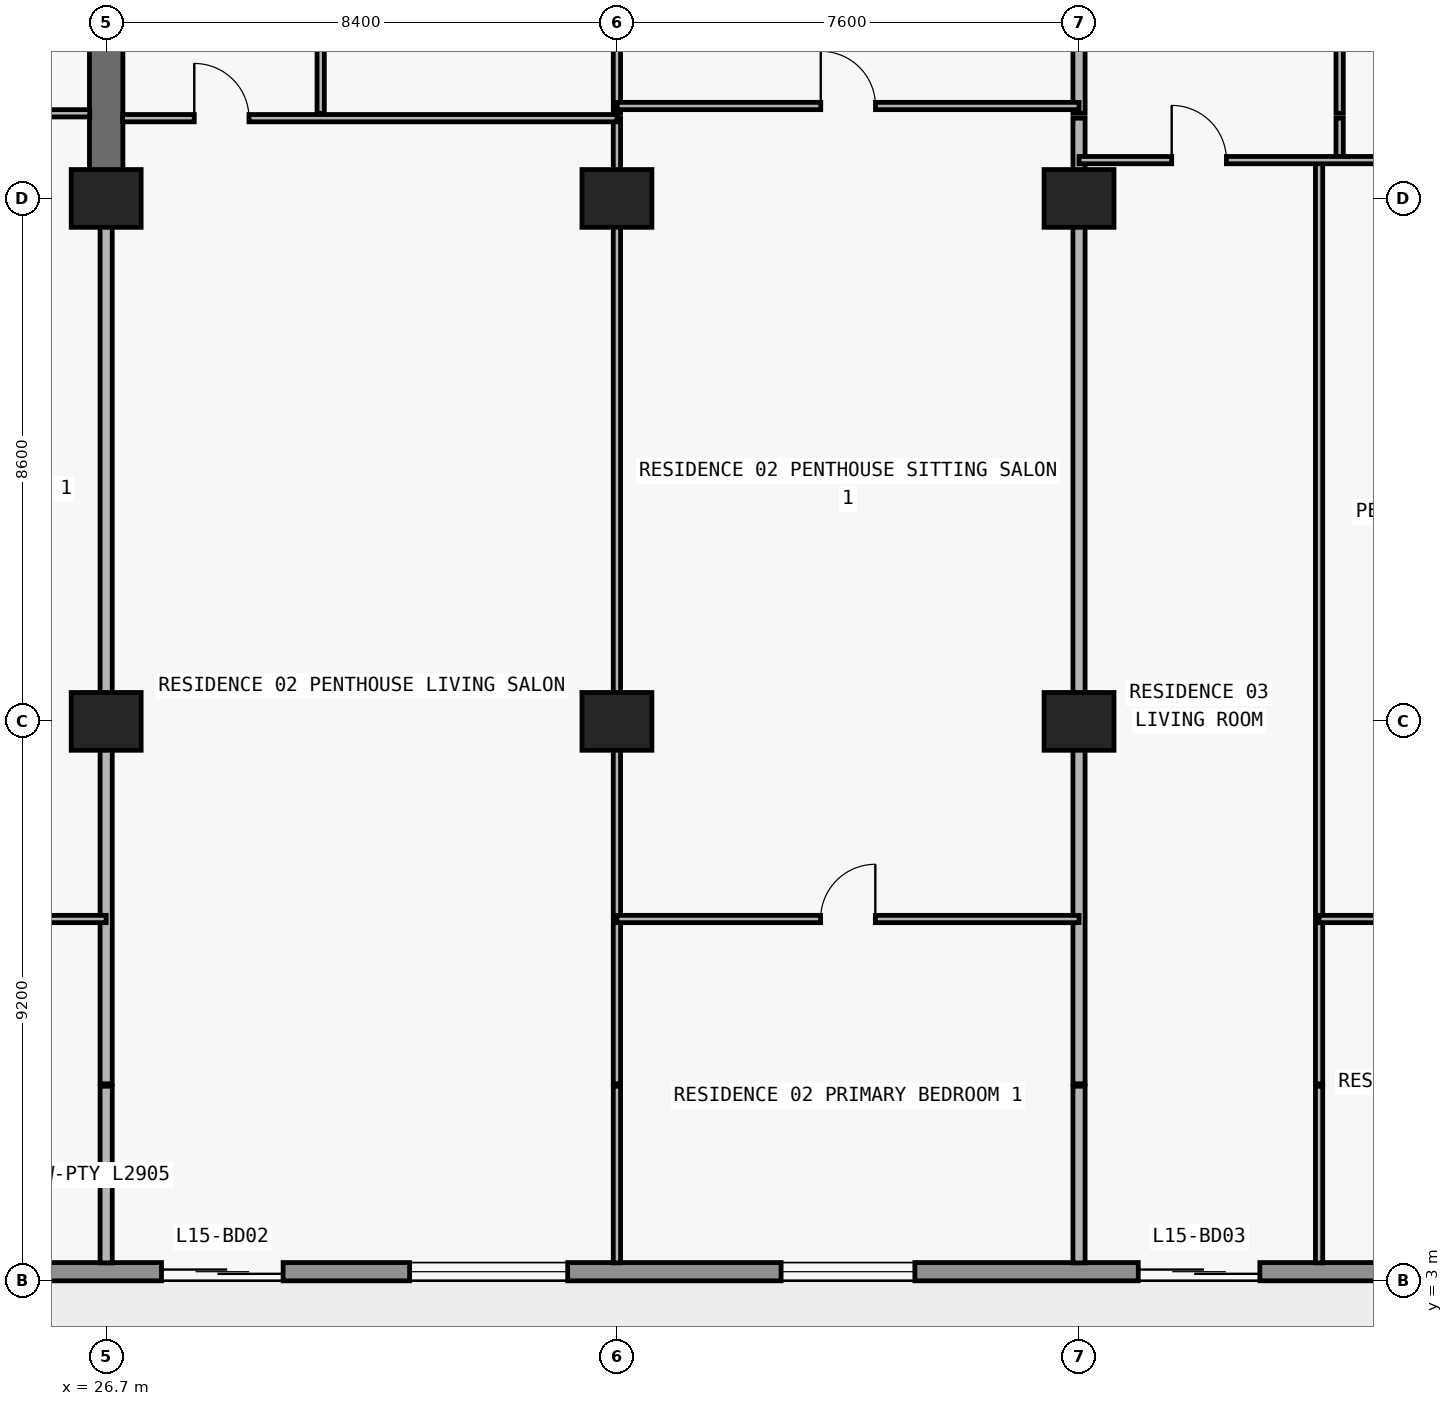
"""IFC4 building model, lengths in metres.
Left out: names, types, materials, properties, quantities, classifications, styles, units other than length and angle.
Written with IfcOpenShell. Run it as: python <this file> out.ifc"""

import sys

from ifc_helpers import new_model, si_unit, direction, frame, frame_2d, origin, origin_2d, place, context, subcontext, project, spatial, rectangle, extrude, element, fill, save


model = new_model("IFC4")
c1 = context("Model", 3, precision=1e-05, world=origin(), true_north=direction((0.0, 1.0)))
c2 = subcontext(c1, "Body", "Model", "MODEL_VIEW")
j1 = project(units=[si_unit("LENGTHUNIT", "METRE"), si_unit("PLANEANGLEUNIT", "RADIAN")], contexts=[c1])
p1 = place(None, origin())
s1 = spatial("IfcSite", under=j1, at=p1, CompositionType="ELEMENT")
p2 = place(p1, origin())
s2 = spatial("IfcBuilding", under=s1, at=p2, CompositionType="ELEMENT")
p3 = place(p2, frame((0.0, 0.0, 59.7)))
s3 = spatial("IfcBuildingStorey", under=s2, at=p3, CompositionType="ELEMENT", Elevation=59.7)
for number, where, z_axis, x_axis in (
    (1, (26.7, 12.2, 0.0), (0.0, 0.0, 1.0), (1.0, 0.0, 0.0)),
    (2, (35.1, 12.2, 0.0), (0.0, 0.0, 1.0), (1.0, 0.0, 0.0)),
    (3, (42.7, 12.2, 0.0), (0.0, 0.0, 1.0), (1.0, 0.0, 0.0)),
    (4, (26.7, 20.8, 0.0), (0.0, 0.0, 1.0), (1.0, 0.0, 0.0)),
    (5, (35.1, 20.8, 0.0), (0.0, 0.0, 1.0), (1.0, 0.0, 0.0)),
    (6, (42.7, 20.8, 0.0), (0.0, 0.0, 1.0), (1.0, 0.0, 0.0)),
):
    element("IfcColumn", number, at=place(p3, frame(where, z_axis=z_axis, x_axis=x_axis)), inside=s3, PredefinedType="COLUMN", context=c2, shape_type="SweptSolid", body=[
        extrude(rectangle(XDim=1.15, YDim=0.95, at=origin_2d()), origin(), (0.0, 0.0, 1.0), 3.05),
    ])
p4 = place(p3, frame((26.7, 20.8, 0.0), z_axis=(0.0, 0.0, 1.0), x_axis=(0.0, 1.0, 0.0)))
e7 = element("IfcWall", 7, at=p4, inside=s3, PredefinedType="SHEAR", context=c2, shape_type="SweptSolid", body=[
    extrude(rectangle(XDim=8.6, YDim=0.55, at=frame_2d((4.3, 0.0))), origin(), (0.0, 0.0, 1.0), 3.05),
])
p5 = place(p3, frame((72.7, 3.15, 0.0), z_axis=(0.0, 0.0, 1.0), x_axis=(-1.0, 0.0, 0.0)))
e8 = element("IfcWall", 8, at=p5, inside=s3, PredefinedType="STANDARD", context=c2, shape_type="SweptSolid", body=[
    extrude(rectangle(XDim=67.6, YDim=0.3, at=frame_2d((33.8, 0.0))), origin(), (0.0, 0.0, 1.0), 3.05),
])
p6 = place(p5, frame((59.89, 0.0, 0.0)))
e9 = element("IfcOpeningElement", 9, at=p6, cuts=e8, PredefinedType="OPENING", context=c2, shape_type="SweptSolid", body=[
    extrude(rectangle(XDim=2.0, YDim=2.3, at=frame_2d((1.0, 1.15))), frame((0.0, 0.16, 0.0), z_axis=(0.0, -1.0, 0.0), x_axis=(1.0, 0.0, 0.0)), (0.0, 0.0, 1.0), 0.32),
])
p7 = place(p5, frame((55.21, 0.0, 0.65)))
e10 = element("IfcOpeningElement", 10, at=p7, cuts=e8, PredefinedType="OPENING", context=c2, shape_type="SweptSolid", body=[
    extrude(rectangle(XDim=2.6, YDim=1.85, at=frame_2d((1.3, 0.925))), frame((0.0, 0.16, 0.0), z_axis=(0.0, -1.0, 0.0), x_axis=(1.0, 0.0, 0.0)), (0.0, 0.0, 1.0), 0.32),
])
p8 = place(p5, frame((49.1, 0.0, 0.85)))
e11 = element("IfcOpeningElement", 11, at=p8, cuts=e8, PredefinedType="OPENING", context=c2, shape_type="SweptSolid", body=[
    extrude(rectangle(XDim=2.2, YDim=1.55, at=frame_2d((1.1, 0.775))), frame((0.0, 0.16, 0.0), z_axis=(0.0, -1.0, 0.0), x_axis=(1.0, 0.0, 0.0)), (0.0, 0.0, 1.0), 0.32),
])
p9 = place(p5, frame((43.09, 0.0, 0.0)))
e12 = element("IfcOpeningElement", 12, at=p9, cuts=e8, PredefinedType="OPENING", context=c2, shape_type="SweptSolid", body=[
    extrude(rectangle(XDim=2.0, YDim=2.3, at=frame_2d((1.0, 1.15))), frame((0.0, 0.16, 0.0), z_axis=(0.0, -1.0, 0.0), x_axis=(1.0, 0.0, 0.0)), (0.0, 0.0, 1.0), 0.32),
])
p10 = place(p5, frame((38.41, 0.0, 0.65)))
e13 = element("IfcOpeningElement", 13, at=p10, cuts=e8, PredefinedType="OPENING", context=c2, shape_type="SweptSolid", body=[
    extrude(rectangle(XDim=2.6, YDim=1.85, at=frame_2d((1.3, 0.925))), frame((0.0, 0.16, 0.0), z_axis=(0.0, -1.0, 0.0), x_axis=(1.0, 0.0, 0.0)), (0.0, 0.0, 1.0), 0.32),
])
p11 = place(p5, frame((32.7, 0.0, 0.85)))
e14 = element("IfcOpeningElement", 14, at=p11, cuts=e8, PredefinedType="OPENING", context=c2, shape_type="SweptSolid", body=[
    extrude(rectangle(XDim=2.2, YDim=1.55, at=frame_2d((1.1, 0.775))), frame((0.0, 0.16, 0.0), z_axis=(0.0, -1.0, 0.0), x_axis=(1.0, 0.0, 0.0)), (0.0, 0.0, 1.0), 0.32),
])
p12 = place(p5, frame((27.026, 0.0, 0.0)))
e15 = element("IfcOpeningElement", 15, at=p12, cuts=e8, PredefinedType="OPENING", context=c2, shape_type="SweptSolid", body=[
    extrude(rectangle(XDim=2.0, YDim=2.3, at=frame_2d((1.0, 1.15))), frame((0.0, 0.16, 0.0), z_axis=(0.0, -1.0, 0.0), x_axis=(1.0, 0.0, 0.0)), (0.0, 0.0, 1.0), 0.32),
])
p13 = place(p5, frame((22.726, 0.0, 0.85)))
e16 = element("IfcOpeningElement", 16, at=p13, cuts=e8, PredefinedType="OPENING", context=c2, shape_type="SweptSolid", body=[
    extrude(rectangle(XDim=2.2, YDim=1.55, at=frame_2d((1.1, 0.775))), frame((0.0, 0.16, 0.0), z_axis=(0.0, -1.0, 0.0), x_axis=(1.0, 0.0, 0.0)), (0.0, 0.0, 1.0), 0.32),
])
p14 = place(p5, frame((18.29, 0.0, 0.0)))
e17 = element("IfcOpeningElement", 17, at=p14, cuts=e8, PredefinedType="OPENING", context=c2, shape_type="SweptSolid", body=[
    extrude(rectangle(XDim=2.0, YDim=2.3, at=frame_2d((1.0, 1.15))), frame((0.0, 0.16, 0.0), z_axis=(0.0, -1.0, 0.0), x_axis=(1.0, 0.0, 0.0)), (0.0, 0.0, 1.0), 0.32),
])
p15 = place(p5, frame((14.19, 0.0, 0.85)))
e18 = element("IfcOpeningElement", 18, at=p15, cuts=e8, PredefinedType="OPENING", context=c2, shape_type="SweptSolid", body=[
    extrude(rectangle(XDim=1.8, YDim=1.55, at=frame_2d((0.9, 0.775))), frame((0.0, 0.16, 0.0), z_axis=(0.0, -1.0, 0.0), x_axis=(1.0, 0.0, 0.0)), (0.0, 0.0, 1.0), 0.32),
])
p16 = place(p5, frame((10.226, 0.0, 0.0)))
e19 = element("IfcOpeningElement", 19, at=p16, cuts=e8, PredefinedType="OPENING", context=c2, shape_type="SweptSolid", body=[
    extrude(rectangle(XDim=2.0, YDim=2.3, at=frame_2d((1.0, 1.15))), frame((0.0, 0.16, 0.0), z_axis=(0.0, -1.0, 0.0), x_axis=(1.0, 0.0, 0.0)), (0.0, 0.0, 1.0), 0.32),
])
p17 = place(p5, frame((5.926, 0.0, 0.85)))
e20 = element("IfcOpeningElement", 20, at=p17, cuts=e8, PredefinedType="OPENING", context=c2, shape_type="SweptSolid", body=[
    extrude(rectangle(XDim=2.2, YDim=1.55, at=frame_2d((1.1, 0.775))), frame((0.0, 0.16, 0.0), z_axis=(0.0, -1.0, 0.0), x_axis=(1.0, 0.0, 0.0)), (0.0, 0.0, 1.0), 0.32),
])
p18 = place(p3, frame((26.7, 3.295, 0.0), z_axis=(0.0, 0.0, 1.0), x_axis=(0.0, 1.0, 0.0)))
e21 = element("IfcWall", 21, at=p18, inside=s3, PredefinedType="PARTITIONING", context=c2, shape_type="SweptSolid", body=[
    extrude(rectangle(XDim=2.905, YDim=0.2, at=frame_2d((1.453, 0.0))), origin(), (0.0, 0.0, 1.0), 3.05),
])
p19 = place(p3, frame((26.7, 6.24, 0.0), z_axis=(0.0, 0.0, 1.0), x_axis=(0.0, 1.0, 0.0)))
e22 = element("IfcWall", 22, at=p19, inside=s3, PredefinedType="PARTITIONING", context=c2, shape_type="SweptSolid", body=[
    extrude(rectangle(XDim=14.555, YDim=0.2, at=frame_2d((7.277, 0.0))), origin(), (0.0, 0.0, 1.0), 2.11),
])
p20 = place(p3, frame((30.228, 22.2, 0.0), z_axis=(0.0, 0.0, 1.0), x_axis=(0.0, 1.0, 0.0)))
e23 = element("IfcWall", 23, at=p20, inside=s3, PredefinedType="PARTITIONING", context=c2, shape_type="SweptSolid", body=[
    extrude(rectangle(XDim=4.38, YDim=0.12, at=frame_2d((2.19, 0.0))), origin(), (0.0, 0.0, 1.0), 3.05),
])
p21 = place(p20, frame((1.74, 0.0, 0.0)))
e24 = element("IfcOpeningElement", 24, at=p21, cuts=e23, PredefinedType="OPENING", context=c2, shape_type="SweptSolid", body=[
    extrude(rectangle(XDim=0.9, YDim=2.15, at=frame_2d((0.45, 1.075))), frame((0.0, 0.07, 0.0), z_axis=(0.0, -1.0, 0.0), x_axis=(1.0, 0.0, 0.0)), (0.0, 0.0, 1.0), 0.14),
])
p22 = place(p3, frame((35.1, 3.295, 0.0), z_axis=(0.0, 0.0, 1.0), x_axis=(0.0, 1.0, 0.0)))
e25 = element("IfcWall", 25, at=p22, inside=s3, PredefinedType="PARTITIONING", context=c2, shape_type="SweptSolid", body=[
    extrude(rectangle(XDim=2.905, YDim=0.12, at=frame_2d((1.453, 0.0))), origin(), (0.0, 0.0, 1.0), 3.05),
])
p23 = place(p3, frame((35.1, 6.24, 0.0), z_axis=(0.0, 0.0, 1.0), x_axis=(0.0, 1.0, 0.0)))
e26 = element("IfcWall", 26, at=p23, inside=s3, PredefinedType="PARTITIONING", context=c2, shape_type="SweptSolid", body=[
    extrude(rectangle(XDim=15.88, YDim=0.12, at=frame_2d((7.94, 0.0))), origin(), (0.0, 0.0, 1.0), 2.11),
])
p24 = place(p3, frame((35.1, 22.2, 0.0), z_axis=(0.0, 0.0, 1.0), x_axis=(0.0, 1.0, 0.0)))
e27 = element("IfcWall", 27, at=p24, inside=s3, PredefinedType="PARTITIONING", context=c2, shape_type="SweptSolid", body=[
    extrude(rectangle(XDim=4.38, YDim=0.12, at=frame_2d((2.19, 0.0))), origin(), (0.0, 0.0, 1.0), 2.11),
])
p25 = place(p24, frame((1.8, 0.0, 0.0)))
e28 = element("IfcOpeningElement", 28, at=p25, cuts=e27, PredefinedType="OPENING", context=c2, shape_type="SweptSolid", body=[
    extrude(rectangle(XDim=0.9, YDim=2.06, at=frame_2d((0.45, 1.03))), frame((0.0, 0.07, 0.0), z_axis=(0.0, -1.0, 0.0), x_axis=(1.0, 0.0, 0.0)), (0.0, 0.0, 1.0), 0.14),
])
p26 = place(p3, frame((42.7, 3.295, 0.0), z_axis=(0.0, 0.0, 1.0), x_axis=(0.0, 1.0, 0.0)))
e29 = element("IfcWall", 29, at=p26, inside=s3, PredefinedType="PARTITIONING", context=c2, shape_type="SweptSolid", body=[
    extrude(rectangle(XDim=2.905, YDim=0.2, at=frame_2d((1.453, 0.0))), origin(), (0.0, 0.0, 1.0), 3.05),
])
p27 = place(p3, frame((42.7, 6.24, 0.0), z_axis=(0.0, 0.0, 1.0), x_axis=(0.0, 1.0, 0.0)))
e30 = element("IfcWall", 30, at=p27, inside=s3, PredefinedType="PARTITIONING", context=c2, shape_type="SweptSolid", body=[
    extrude(rectangle(XDim=15.88, YDim=0.2, at=frame_2d((7.94, 0.0))), origin(), (0.0, 0.0, 1.0), 2.11),
])
p28 = place(p3, frame((42.7, 22.2, 0.0), z_axis=(0.0, 0.0, 1.0), x_axis=(0.0, 1.0, 0.0)))
e31 = element("IfcWall", 31, at=p28, inside=s3, PredefinedType="PARTITIONING", context=c2, shape_type="SweptSolid", body=[
    extrude(rectangle(XDim=4.38, YDim=0.2, at=frame_2d((2.19, 0.0))), origin(), (0.0, 0.0, 1.0), 2.11),
])
p29 = place(p3, frame((46.648, 3.295, 0.0), z_axis=(0.0, 0.0, 1.0), x_axis=(0.0, 1.0, 0.0)))
e32 = element("IfcWall", 32, at=p29, inside=s3, PredefinedType="PARTITIONING", context=c2, shape_type="SweptSolid", body=[
    extrude(rectangle(XDim=2.905, YDim=0.12, at=frame_2d((1.453, 0.0))), origin(), (0.0, 0.0, 1.0), 3.05),
])
p30 = place(p3, frame((46.648, 6.24, 0.0), z_axis=(0.0, 0.0, 1.0), x_axis=(0.0, 1.0, 0.0)))
e33 = element("IfcWall", 33, at=p30, inside=s3, PredefinedType="PARTITIONING", context=c2, shape_type="SweptSolid", body=[
    extrude(rectangle(XDim=15.19, YDim=0.12, at=frame_2d((7.595, 0.0))), origin(), (0.0, 0.0, 1.0), 3.05),
])
p31 = place(p3, frame((46.986, 21.43, 0.0), z_axis=(0.0, 0.0, 1.0), x_axis=(0.0, 1.0, 0.0)))
e34 = element("IfcWall", 34, at=p31, inside=s3, PredefinedType="PARTITIONING", context=c2, shape_type="SweptSolid", body=[
    extrude(rectangle(XDim=0.69, YDim=0.12, at=frame_2d((0.345, 0.0))), origin(), (0.0, 0.0, 1.0), 3.05),
])
p32 = place(p3, frame((46.986, 22.2, 0.0), z_axis=(0.0, 0.0, 1.0), x_axis=(0.0, 1.0, 0.0)))
e35 = element("IfcWall", 35, at=p32, inside=s3, PredefinedType="PARTITIONING", context=c2, shape_type="SweptSolid", body=[
    extrude(rectangle(XDim=4.38, YDim=0.12, at=frame_2d((2.19, 0.0))), origin(), (0.0, 0.0, 1.0), 3.05),
])
p33 = place(p32, frame((1.74, 0.0, 0.0)))
e36 = element("IfcOpeningElement", 36, at=p33, cuts=e35, PredefinedType="OPENING", context=c2, shape_type="SweptSolid", body=[
    extrude(rectangle(XDim=0.9, YDim=2.15, at=frame_2d((0.45, 1.075))), frame((0.0, 0.07, 0.0), z_axis=(0.0, -1.0, 0.0), x_axis=(1.0, 0.0, 0.0)), (0.0, 0.0, 1.0), 0.14),
])
p34 = place(p3, frame((18.3, 8.95, 0.0), z_axis=(0.0, 0.0, 1.0), x_axis=(1.0, 0.0, 0.0)))
e37 = element("IfcWall", 37, at=p34, inside=s3, PredefinedType="PARTITIONING", context=c2, shape_type="SweptSolid", body=[
    extrude(rectangle(XDim=8.4, YDim=0.12, at=frame_2d((4.2, 0.0))), origin(), (0.0, 0.0, 1.0), 3.05),
])
p35 = place(p34, frame((3.75, 0.0, 0.0)))
e38 = element("IfcOpeningElement", 38, at=p35, cuts=e37, PredefinedType="OPENING", context=c2, shape_type="SweptSolid", body=[
    extrude(rectangle(XDim=0.9, YDim=2.15, at=frame_2d((0.45, 1.075))), frame((0.0, 0.07, 0.0), z_axis=(0.0, -1.0, 0.0), x_axis=(1.0, 0.0, 0.0)), (0.0, 0.0, 1.0), 0.14),
])
p36 = place(p3, frame((35.1, 8.95, 0.0), z_axis=(0.0, 0.0, 1.0), x_axis=(1.0, 0.0, 0.0)))
e39 = element("IfcWall", 39, at=p36, inside=s3, PredefinedType="PARTITIONING", context=c2, shape_type="SweptSolid", body=[
    extrude(rectangle(XDim=7.6, YDim=0.12, at=frame_2d((3.8, 0.0))), origin(), (0.0, 0.0, 1.0), 3.05),
])
p37 = place(p36, frame((3.35, 0.0, 0.0)))
e40 = element("IfcOpeningElement", 40, at=p37, cuts=e39, PredefinedType="OPENING", context=c2, shape_type="SweptSolid", body=[
    extrude(rectangle(XDim=0.9, YDim=2.15, at=frame_2d((0.45, 1.075))), frame((0.0, 0.07, 0.0), z_axis=(0.0, -1.0, 0.0), x_axis=(1.0, 0.0, 0.0)), (0.0, 0.0, 1.0), 0.14),
])
p38 = place(p3, frame((46.648, 8.95, 0.0), z_axis=(0.0, 0.0, 1.0), x_axis=(1.0, 0.0, 0.0)))
e41 = element("IfcWall", 41, at=p38, inside=s3, PredefinedType="PARTITIONING", context=c2, shape_type="SweptSolid", body=[
    extrude(rectangle(XDim=4.452, YDim=0.12, at=frame_2d((2.226, 0.0))), origin(), (0.0, 0.0, 1.0), 3.05),
])
p39 = place(p38, frame((1.776, 0.0, 0.0)))
e42 = element("IfcOpeningElement", 42, at=p39, cuts=e41, PredefinedType="OPENING", context=c2, shape_type="SweptSolid", body=[
    extrude(rectangle(XDim=0.9, YDim=2.15, at=frame_2d((0.45, 1.075))), frame((0.0, 0.07, 0.0), z_axis=(0.0, -1.0, 0.0), x_axis=(1.0, 0.0, 0.0)), (0.0, 0.0, 1.0), 0.14),
])
p40 = place(p3, frame((42.7, 21.43, 0.0), z_axis=(0.0, 0.0, 1.0), x_axis=(1.0, 0.0, 0.0)))
e43 = element("IfcWall", 43, at=p40, inside=s3, PredefinedType="PARTITIONING", context=c2, shape_type="SweptSolid", body=[
    extrude(rectangle(XDim=8.13, YDim=0.12, at=frame_2d((4.065, 0.0))), origin(), (0.0, 0.0, 1.0), 3.05),
])
p41 = place(p40, frame((1.524, 0.0, 0.0)))
e44 = element("IfcOpeningElement", 44, at=p41, cuts=e43, PredefinedType="OPENING", context=c2, shape_type="SweptSolid", body=[
    extrude(rectangle(XDim=0.9, YDim=2.15, at=frame_2d((0.45, 1.075))), frame((0.0, 0.07, 0.0), z_axis=(0.0, -1.0, 0.0), x_axis=(1.0, 0.0, 0.0)), (0.0, 0.0, 1.0), 0.14),
])
p42 = place(p40, frame((5.758, 0.0, 0.0)))
e45 = element("IfcOpeningElement", 45, at=p42, cuts=e43, PredefinedType="OPENING", context=c2, shape_type="SweptSolid", body=[
    extrude(rectangle(XDim=0.9, YDim=2.15, at=frame_2d((0.45, 1.075))), frame((0.0, 0.07, 0.0), z_axis=(0.0, -1.0, 0.0), x_axis=(1.0, 0.0, 0.0)), (0.0, 0.0, 1.0), 0.14),
])
p43 = place(p3, frame((26.97, 22.12, 0.0), z_axis=(0.0, 0.0, 1.0), x_axis=(1.0, 0.0, 0.0)))
e46 = element("IfcWall", 46, at=p43, inside=s3, PredefinedType="PARTITIONING", context=c2, shape_type="SweptSolid", body=[
    extrude(rectangle(XDim=8.13, YDim=0.12, at=frame_2d((4.065, 0.0))), origin(), (0.0, 0.0, 1.0), 3.05),
])
p44 = place(p43, frame((1.179, 0.0, 0.0)))
e47 = element("IfcOpeningElement", 47, at=p44, cuts=e46, PredefinedType="OPENING", context=c2, shape_type="SweptSolid", body=[
    extrude(rectangle(XDim=0.9, YDim=2.15, at=frame_2d((0.45, 1.075))), frame((0.0, 0.07, 0.0), z_axis=(0.0, -1.0, 0.0), x_axis=(1.0, 0.0, 0.0)), (0.0, 0.0, 1.0), 0.14),
])
p45 = place(p3, frame((18.305, 22.2, 0.0), z_axis=(0.0, 0.0, 1.0), x_axis=(1.0, 0.0, 0.0)))
e48 = element("IfcWall", 48, at=p45, inside=s3, PredefinedType="PARTITIONING", context=c2, shape_type="SweptSolid", body=[
    extrude(rectangle(XDim=8.125, YDim=0.12, at=frame_2d((4.062, 0.0))), origin(), (0.0, 0.0, 1.0), 3.05),
])
p46 = place(p45, frame((3.613, 0.0, 0.0)))
e49 = element("IfcOpeningElement", 49, at=p46, cuts=e48, PredefinedType="OPENING", context=c2, shape_type="SweptSolid", body=[
    extrude(rectangle(XDim=0.9, YDim=2.15, at=frame_2d((0.45, 1.075))), frame((0.0, 0.07, 0.0), z_axis=(0.0, -1.0, 0.0), x_axis=(1.0, 0.0, 0.0)), (0.0, 0.0, 1.0), 0.14),
])
p47 = place(p3, frame((35.105, 22.32, 0.0), z_axis=(0.0, 0.0, 1.0), x_axis=(1.0, 0.0, 0.0)))
e50 = element("IfcWall", 50, at=p47, inside=s3, PredefinedType="PARTITIONING", context=c2, shape_type="SweptSolid", body=[
    extrude(rectangle(XDim=7.595, YDim=0.12, at=frame_2d((3.797, 0.0))), origin(), (0.0, 0.0, 1.0), 3.05),
])
p48 = place(p47, frame((3.347, 0.0, 0.0)))
e51 = element("IfcOpeningElement", 51, at=p48, cuts=e50, PredefinedType="OPENING", context=c2, shape_type="SweptSolid", body=[
    extrude(rectangle(XDim=0.9, YDim=2.15, at=frame_2d((0.45, 1.075))), frame((0.0, 0.07, 0.0), z_axis=(0.0, -1.0, 0.0), x_axis=(1.0, 0.0, 0.0)), (0.0, 0.0, 1.0), 0.14),
])
p49 = place(p9, origin())
e52 = element("IfcDoor", 52, at=p49, inside=s3, OperationType="DOUBLE_DOOR_SLIDING", PredefinedType="DOOR", context=c2, shape_type="SweptSolid", body=[
    extrude(rectangle(XDim=2.0, YDim=2.3, at=frame_2d((1.0, 1.15))), frame((0.0, 0.025, 0.0), z_axis=(0.0, -1.0, 0.0), x_axis=(1.0, 0.0, 0.0)), (0.0, 0.0, 1.0), 0.05),
])
fill(e12, e52)
p50 = place(p10, origin())
e53 = element("IfcWindow", 53, at=p50, inside=s3, PartitioningType="SINGLE_PANEL", PredefinedType="WINDOW", context=c2, shape_type="SweptSolid", body=[
    extrude(rectangle(XDim=2.6, YDim=1.85, at=frame_2d((1.3, 0.925))), frame((0.0, 0.03, 0.0), z_axis=(0.0, -1.0, 0.0), x_axis=(1.0, 0.0, 0.0)), (0.0, 0.0, 1.0), 0.06),
])
fill(e13, e53)
p51 = place(p11, origin())
e54 = element("IfcWindow", 54, at=p51, inside=s3, PartitioningType="SINGLE_PANEL", PredefinedType="WINDOW", context=c2, shape_type="SweptSolid", body=[
    extrude(rectangle(XDim=2.2, YDim=1.55, at=frame_2d((1.1, 0.775))), frame((0.0, 0.03, 0.0), z_axis=(0.0, -1.0, 0.0), x_axis=(1.0, 0.0, 0.0)), (0.0, 0.0, 1.0), 0.06),
])
fill(e14, e54)
p52 = place(p12, origin())
e55 = element("IfcDoor", 55, at=p52, inside=s3, OperationType="DOUBLE_DOOR_SLIDING", PredefinedType="DOOR", context=c2, shape_type="SweptSolid", body=[
    extrude(rectangle(XDim=2.0, YDim=2.3, at=frame_2d((1.0, 1.15))), frame((0.0, 0.025, 0.0), z_axis=(0.0, -1.0, 0.0), x_axis=(1.0, 0.0, 0.0)), (0.0, 0.0, 1.0), 0.05),
])
fill(e15, e55)
p53 = place(p44, origin())
e56 = element("IfcDoor", 56, at=p53, inside=s3, OperationType="SINGLE_SWING_LEFT", PredefinedType="DOOR", context=c2, shape_type="SweptSolid", body=[
    extrude(rectangle(XDim=0.9, YDim=2.15, at=frame_2d((0.45, 1.075))), frame((0.0, 0.025, 0.0), z_axis=(0.0, -1.0, 0.0), x_axis=(1.0, 0.0, 0.0)), (0.0, 0.0, 1.0), 0.05),
])
fill(e47, e56)
p54 = place(p48, origin())
e57 = element("IfcDoor", 57, at=p54, inside=s3, OperationType="SINGLE_SWING_LEFT", PredefinedType="DOOR", context=c2, shape_type="SweptSolid", body=[
    extrude(rectangle(XDim=0.9, YDim=2.15, at=frame_2d((0.45, 1.075))), frame((0.0, 0.025, 0.0), z_axis=(0.0, -1.0, 0.0), x_axis=(1.0, 0.0, 0.0)), (0.0, 0.0, 1.0), 0.05),
])
fill(e51, e57)
p55 = place(p37, origin())
e58 = element("IfcDoor", 58, at=p55, inside=s3, OperationType="SINGLE_SWING_RIGHT", PredefinedType="DOOR", context=c2, shape_type="SweptSolid", body=[
    extrude(rectangle(XDim=0.9, YDim=2.15, at=frame_2d((0.45, 1.075))), frame((0.0, 0.025, 0.0), z_axis=(0.0, -1.0, 0.0), x_axis=(1.0, 0.0, 0.0)), (0.0, 0.0, 1.0), 0.05),
])
fill(e40, e58)
p56 = place(p41, origin())
e59 = element("IfcDoor", 59, at=p56, inside=s3, OperationType="SINGLE_SWING_LEFT", PredefinedType="DOOR", context=c2, shape_type="SweptSolid", body=[
    extrude(rectangle(XDim=0.9, YDim=2.15, at=frame_2d((0.45, 1.075))), frame((0.0, 0.025, 0.0), z_axis=(0.0, -1.0, 0.0), x_axis=(1.0, 0.0, 0.0)), (0.0, 0.0, 1.0), 0.05),
])
fill(e44, e59)
save(model, sys.argv[1])
